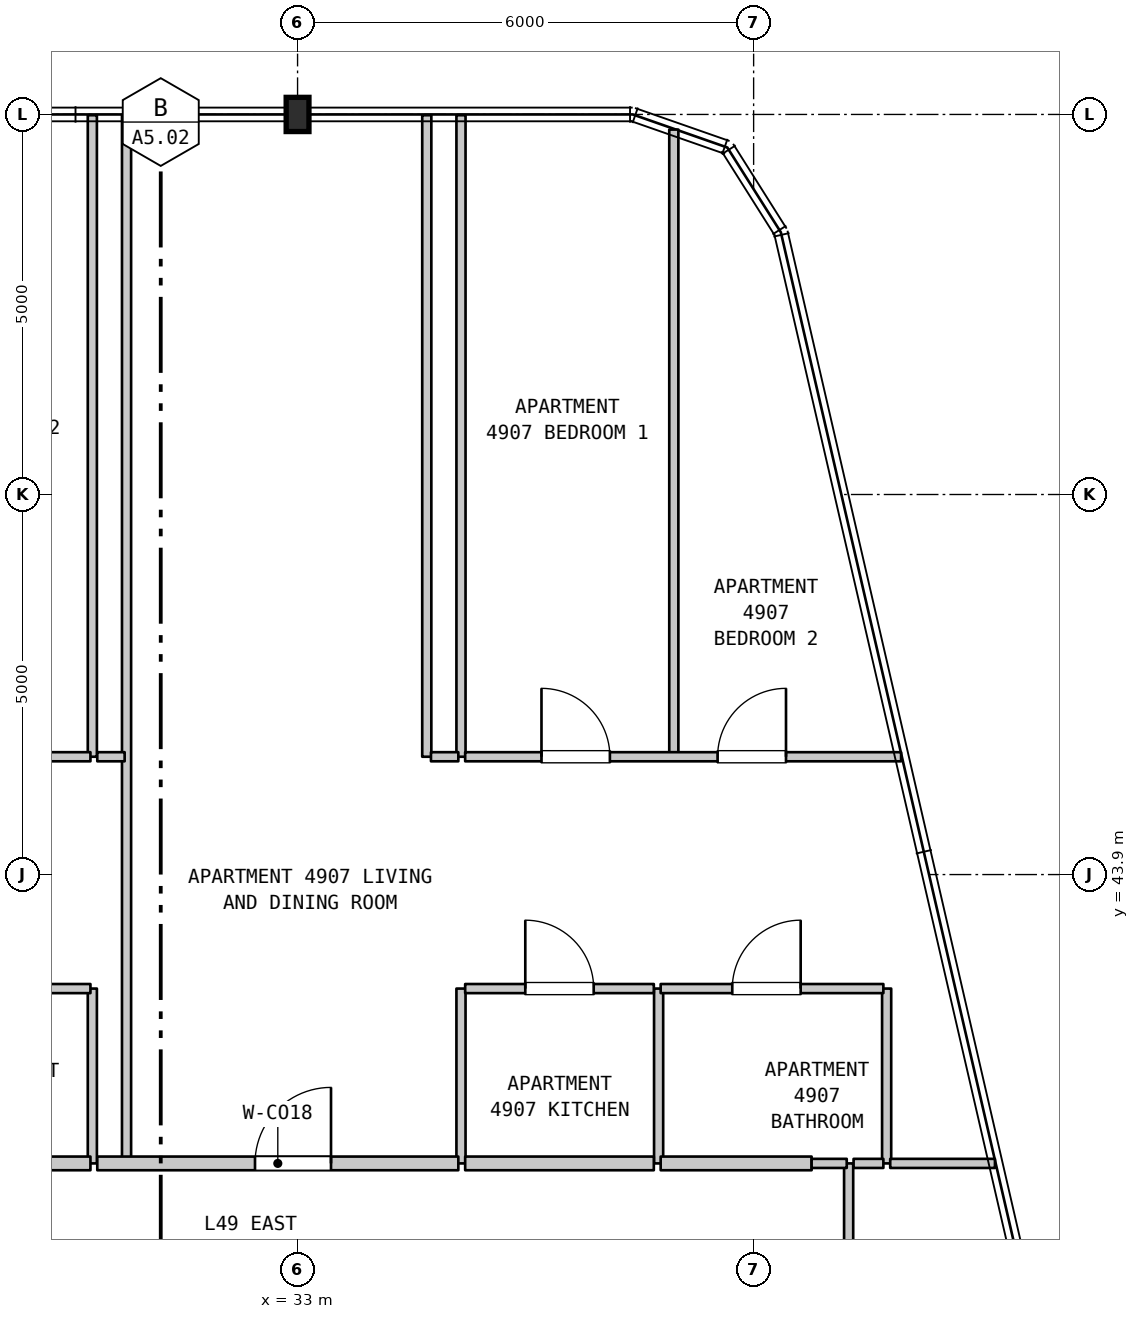
"""IFC4 building model, lengths in metres.
Left out: names, types, materials, properties, quantities, classifications, styles, units other than length and angle.
Written with IfcOpenShell. Run it as: python <this file> out.ifc"""

import sys

from ifc_helpers import new_model, si_unit, direction, frame, frame_2d, origin, origin_2d, place, context, subcontext, project, spatial, rectangle, i_section, extrude, element, fill, save


model = new_model("IFC4")
c1 = context("Model", 3, precision=1e-05, world=origin(), true_north=direction((0.0, 1.0)))
c2 = subcontext(c1, "Body", "Model", "MODEL_VIEW")
j1 = project(units=[si_unit("LENGTHUNIT", "METRE"), si_unit("PLANEANGLEUNIT", "RADIAN")], contexts=[c1])
p1 = place(None, origin())
s1 = spatial("IfcSite", under=j1, at=p1, CompositionType="ELEMENT")
p2 = place(p1, origin())
s2 = spatial("IfcBuilding", under=s1, at=p2, CompositionType="ELEMENT")
p3 = place(p2, frame((0.0, 0.0, 199.5)))
s3 = spatial("IfcBuildingStorey", under=s2, at=p3, CompositionType="ELEMENT", Elevation=199.5)
p4 = place(p3, frame((33.0, 53.9, 0.0), z_axis=(0.0, 0.0, 1.0), x_axis=(1.0, 0.0, 0.0)))
e1 = element("IfcColumn", 1, at=p4, inside=s3, PredefinedType="COLUMN", context=c2, shape_type="SweptSolid", body=[
    extrude(i_section(OverallWidth=0.3, OverallDepth=0.45, WebThickness=0.014, FlangeThickness=0.026, FilletRadius=0.027, at=origin_2d()), origin(), (0.0, 0.0, 1.0), 3.7),
])
p5 = place(p3, frame((30.3, 40.1, 0.0), z_axis=(0.0, 0.0, 1.0), x_axis=(0.0, 1.0, 0.0)))
e2 = element("IfcWall", 2, at=p5, inside=s3, PredefinedType="PARTITIONING", context=c2, shape_type="SweptSolid", body=[
    extrude(rectangle(XDim=2.3, YDim=0.12, at=frame_2d((1.15, 0.0))), origin(), (0.0, 0.0, 1.0), 3.39),
])
p6 = place(p3, frame((30.3, 45.45, 0.0), z_axis=(0.0, 0.0, 1.0), x_axis=(0.0, 1.0, 0.0)))
e3 = element("IfcWall", 3, at=p6, inside=s3, PredefinedType="PARTITIONING", context=c2, shape_type="SweptSolid", body=[
    extrude(rectangle(XDim=8.44, YDim=0.12, at=frame_2d((4.22, 0.0))), origin(), (0.0, 0.0, 1.0), 3.39),
])
p7 = place(p3, frame((30.75, 40.1, 0.0), z_axis=(0.0, 0.0, 1.0), x_axis=(0.0, 1.0, 0.0)))
e4 = element("IfcWall", 4, at=p7, inside=s3, PredefinedType="PARTITIONING", context=c2, shape_type="SweptSolid", body=[
    extrude(rectangle(XDim=13.79, YDim=0.12, at=frame_2d((6.895, 0.0))), origin(), (0.0, 0.0, 1.0), 3.39),
])
p8 = place(p3, frame((34.7, 45.45, 0.0), z_axis=(0.0, 0.0, 1.0), x_axis=(0.0, 1.0, 0.0)))
e5 = element("IfcWall", 5, at=p8, inside=s3, PredefinedType="PARTITIONING", context=c2, shape_type="SweptSolid", body=[
    extrude(rectangle(XDim=8.44, YDim=0.12, at=frame_2d((4.22, 0.0))), origin(), (0.0, 0.0, 1.0), 3.39),
])
p9 = place(p3, frame((35.15, 40.1, 0.0), z_axis=(0.0, 0.0, 1.0), x_axis=(0.0, 1.0, 0.0)))
e6 = element("IfcWall", 6, at=p9, inside=s3, PredefinedType="PARTITIONING", context=c2, shape_type="SweptSolid", body=[
    extrude(rectangle(XDim=2.3, YDim=0.12, at=frame_2d((1.15, 0.0))), origin(), (0.0, 0.0, 1.0), 3.39),
])
p10 = place(p3, frame((35.15, 45.45, 0.0), z_axis=(0.0, 0.0, 1.0), x_axis=(0.0, 1.0, 0.0)))
e7 = element("IfcWall", 7, at=p10, inside=s3, PredefinedType="PARTITIONING", context=c2, shape_type="SweptSolid", body=[
    extrude(rectangle(XDim=8.44, YDim=0.12, at=frame_2d((4.22, 0.0))), origin(), (0.0, 0.0, 1.0), 3.39),
])
p11 = place(p3, frame((37.75, 40.1, 0.0), z_axis=(0.0, 0.0, 1.0), x_axis=(0.0, 1.0, 0.0)))
e8 = element("IfcWall", 8, at=p11, inside=s3, PredefinedType="PARTITIONING", context=c2, shape_type="SweptSolid", body=[
    extrude(rectangle(XDim=2.3, YDim=0.12, at=frame_2d((1.15, 0.0))), origin(), (0.0, 0.0, 1.0), 3.39),
])
p12 = place(p3, frame((37.95, 45.45, 0.0), z_axis=(0.0, 0.0, 1.0), x_axis=(0.0, 1.0, 0.0)))
e9 = element("IfcWall", 9, at=p12, inside=s3, PredefinedType="PARTITIONING", context=c2, shape_type="SweptSolid", body=[
    extrude(rectangle(XDim=8.251, YDim=0.12, at=frame_2d((4.125, 0.0))), origin(), (0.0, 0.0, 1.0), 3.39),
])
p13 = place(p3, frame((40.25, 37.9, 0.0), z_axis=(0.0, 0.0, 1.0), x_axis=(0.0, 1.0, 0.0)))
e10 = element("IfcWall", 10, at=p13, inside=s3, PredefinedType="PARTITIONING", context=c2, shape_type="SweptSolid", body=[
    extrude(rectangle(XDim=2.2, YDim=0.12, at=frame_2d((1.1, 0.0))), origin(), (0.0, 0.0, 1.0), 3.39),
])
p14 = place(p3, frame((40.75, 40.1, 0.0), z_axis=(0.0, 0.0, 1.0), x_axis=(0.0, 1.0, 0.0)))
e11 = element("IfcWall", 11, at=p14, inside=s3, PredefinedType="PARTITIONING", context=c2, shape_type="SweptSolid", body=[
    extrude(rectangle(XDim=2.3, YDim=0.12, at=frame_2d((1.15, 0.0))), origin(), (0.0, 0.0, 1.0), 3.39),
])
p15 = place(p3, frame((27.125, 40.1, 0.0), z_axis=(0.0, 0.0, 1.0), x_axis=(1.0, 0.0, 0.0)))
e12 = element("IfcWall", 12, at=p15, inside=s3, PredefinedType="STANDARD", context=c2, shape_type="SweptSolid", body=[
    extrude(rectangle(XDim=3.15, YDim=0.18, at=frame_2d((1.575, 0.0))), origin(), (0.0, 0.0, 1.0), 3.39),
])
p16 = place(p3, frame((30.365, 40.1, 0.0), z_axis=(0.0, 0.0, 1.0), x_axis=(1.0, 0.0, 0.0)))
e13 = element("IfcWall", 13, at=p16, inside=s3, PredefinedType="STANDARD", context=c2, shape_type="SweptSolid", body=[
    extrude(rectangle(XDim=4.75, YDim=0.18, at=frame_2d((2.375, 0.0))), origin(), (0.0, 0.0, 1.0), 3.39),
])
p17 = place(p16, frame((2.075, 0.0, 0.0)))
e14 = element("IfcOpeningElement", 14, at=p17, cuts=e13, PredefinedType="OPENING", context=c2, shape_type="SweptSolid", body=[
    extrude(rectangle(XDim=1.0, YDim=2.15, at=frame_2d((0.5, 1.075))), frame((0.0, 0.1, 0.0), z_axis=(0.0, -1.0, 0.0), x_axis=(1.0, 0.0, 0.0)), (0.0, 0.0, 1.0), 0.2),
])
p18 = place(p3, frame((35.205, 40.1, 0.0), z_axis=(0.0, 0.0, 1.0), x_axis=(1.0, 0.0, 0.0)))
e15 = element("IfcWall", 15, at=p18, inside=s3, PredefinedType="STANDARD", context=c2, shape_type="SweptSolid", body=[
    extrude(rectangle(XDim=2.482, YDim=0.18, at=frame_2d((1.241, 0.0))), origin(), (0.0, 0.0, 1.0), 3.39),
])
p19 = place(p3, frame((37.777, 40.1, 0.0), z_axis=(0.0, 0.0, 1.0), x_axis=(1.0, 0.0, 0.0)))
e16 = element("IfcWall", 16, at=p19, inside=s3, PredefinedType="STANDARD", context=c2, shape_type="SweptSolid", body=[
    extrude(rectangle(XDim=1.986, YDim=0.18, at=frame_2d((0.993, 0.0))), origin(), (0.0, 0.0, 1.0), 3.39),
])
p20 = place(p3, frame((39.763, 40.1, 0.0), z_axis=(0.0, 0.0, 1.0), x_axis=(1.0, 0.0, 0.0)))
e17 = element("IfcWall", 17, at=p20, inside=s3, PredefinedType="PARTITIONING", context=c2, shape_type="SweptSolid", body=[
    extrude(rectangle(XDim=0.462, YDim=0.12, at=frame_2d((0.231, 0.0))), origin(), (0.0, 0.0, 1.0), 3.39),
])
p21 = place(p3, frame((40.315, 40.1, 0.0), z_axis=(0.0, 0.0, 1.0), x_axis=(1.0, 0.0, 0.0)))
e18 = element("IfcWall", 18, at=p21, inside=s3, PredefinedType="PARTITIONING", context=c2, shape_type="SweptSolid", body=[
    extrude(rectangle(XDim=0.392, YDim=0.12, at=frame_2d((0.196, 0.0))), origin(), (0.0, 0.0, 1.0), 3.39),
])
p22 = place(p3, frame((40.797, 40.1, 0.0), z_axis=(0.0, 0.0, 1.0), x_axis=(1.0, 0.0, 0.0)))
e19 = element("IfcWall", 19, at=p22, inside=s3, PredefinedType="PARTITIONING", context=c2, shape_type="SweptSolid", body=[
    extrude(rectangle(XDim=1.378, YDim=0.12, at=frame_2d((0.689, 0.0))), origin(), (0.0, 0.0, 1.0), 3.39),
])
p23 = place(p3, frame((27.125, 42.4, 0.0), z_axis=(0.0, 0.0, 1.0), x_axis=(1.0, 0.0, 0.0)))
e20 = element("IfcWall", 20, at=p23, inside=s3, PredefinedType="PARTITIONING", context=c2, shape_type="SweptSolid", body=[
    extrude(rectangle(XDim=3.15, YDim=0.12, at=frame_2d((1.575, 0.0))), origin(), (0.0, 0.0, 1.0), 3.39),
])
p24 = place(p23, frame((1.054, 0.0, 0.0)))
e21 = element("IfcOpeningElement", 21, at=p24, cuts=e20, PredefinedType="OPENING", context=c2, shape_type="SweptSolid", body=[
    extrude(rectangle(XDim=0.9, YDim=2.1, at=frame_2d((0.45, 1.05))), frame((0.0, 0.07, 0.0), z_axis=(0.0, -1.0, 0.0), x_axis=(1.0, 0.0, 0.0)), (0.0, 0.0, 1.0), 0.14),
])
p25 = place(p3, frame((35.205, 42.4, 0.0), z_axis=(0.0, 0.0, 1.0), x_axis=(1.0, 0.0, 0.0)))
e22 = element("IfcWall", 22, at=p25, inside=s3, PredefinedType="PARTITIONING", context=c2, shape_type="SweptSolid", body=[
    extrude(rectangle(XDim=2.482, YDim=0.12, at=frame_2d((1.241, 0.0))), origin(), (0.0, 0.0, 1.0), 3.39),
])
p26 = place(p25, frame((0.791, 0.0, 0.0)))
e23 = element("IfcOpeningElement", 23, at=p26, cuts=e22, PredefinedType="OPENING", context=c2, shape_type="SweptSolid", body=[
    extrude(rectangle(XDim=0.9, YDim=2.15, at=frame_2d((0.45, 1.075))), frame((0.0, 0.07, 0.0), z_axis=(0.0, -1.0, 0.0), x_axis=(1.0, 0.0, 0.0)), (0.0, 0.0, 1.0), 0.14),
])
p27 = place(p3, frame((37.777, 42.4, 0.0), z_axis=(0.0, 0.0, 1.0), x_axis=(1.0, 0.0, 0.0)))
e24 = element("IfcWall", 24, at=p27, inside=s3, PredefinedType="PARTITIONING", context=c2, shape_type="SweptSolid", body=[
    extrude(rectangle(XDim=2.93, YDim=0.12, at=frame_2d((1.465, 0.0))), origin(), (0.0, 0.0, 1.0), 3.39),
])
p28 = place(p27, frame((0.942, 0.0, 0.0)))
e25 = element("IfcOpeningElement", 25, at=p28, cuts=e24, PredefinedType="OPENING", context=c2, shape_type="SweptSolid", body=[
    extrude(rectangle(XDim=0.9, YDim=2.1, at=frame_2d((0.45, 1.05))), frame((0.0, 0.07, 0.0), z_axis=(0.0, -1.0, 0.0), x_axis=(1.0, 0.0, 0.0)), (0.0, 0.0, 1.0), 0.14),
])
p29 = place(p3, frame((24.365, 45.45, 0.0), z_axis=(0.0, 0.0, 1.0), x_axis=(1.0, 0.0, 0.0)))
e26 = element("IfcWall", 26, at=p29, inside=s3, PredefinedType="PARTITIONING", context=c2, shape_type="SweptSolid", body=[
    extrude(rectangle(XDim=5.91, YDim=0.12, at=frame_2d((2.955, 0.0))), origin(), (0.0, 0.0, 1.0), 3.39),
])
p30 = place(p29, frame((1.11, 0.0, 0.0)))
e27 = element("IfcOpeningElement", 27, at=p30, cuts=e26, PredefinedType="OPENING", context=c2, shape_type="SweptSolid", body=[
    extrude(rectangle(XDim=0.9, YDim=2.15, at=frame_2d((0.45, 1.075))), frame((0.0, 0.07, 0.0), z_axis=(0.0, -1.0, 0.0), x_axis=(1.0, 0.0, 0.0)), (0.0, 0.0, 1.0), 0.14),
])
p31 = place(p29, frame((3.76, 0.0, 0.0)))
e28 = element("IfcOpeningElement", 28, at=p31, cuts=e26, PredefinedType="OPENING", context=c2, shape_type="SweptSolid", body=[
    extrude(rectangle(XDim=0.9, YDim=2.15, at=frame_2d((0.45, 1.075))), frame((0.0, 0.07, 0.0), z_axis=(0.0, -1.0, 0.0), x_axis=(1.0, 0.0, 0.0)), (0.0, 0.0, 1.0), 0.14),
])
for number, where, z_axis, x_axis in (
    (29, (30.365, 45.45, 0.0), (0.0, 0.0, 1.0), (1.0, 0.0, 0.0)),
    (30, (34.755, 45.45, 0.0), (0.0, 0.0, 1.0), (1.0, 0.0, 0.0)),
):
    element("IfcWall", number, at=place(p3, frame(where, z_axis=z_axis, x_axis=x_axis)), inside=s3, PredefinedType="PARTITIONING", context=c2, shape_type="SweptSolid", body=[
        extrude(rectangle(XDim=0.36, YDim=0.12, at=frame_2d((0.18, 0.0))), origin(), (0.0, 0.0, 1.0), 3.39),
    ])
p32 = place(p3, frame((35.205, 45.45, 0.0), z_axis=(0.0, 0.0, 1.0), x_axis=(1.0, 0.0, 0.0)))
e31 = element("IfcWall", 31, at=p32, inside=s3, PredefinedType="PARTITIONING", context=c2, shape_type="SweptSolid", body=[
    extrude(rectangle(XDim=5.735, YDim=0.12, at=frame_2d((2.867, 0.0))), origin(), (0.0, 0.0, 1.0), 3.39),
])
p33 = place(p32, frame((1.004, 0.0, 0.0)))
e32 = element("IfcOpeningElement", 32, at=p33, cuts=e31, PredefinedType="OPENING", context=c2, shape_type="SweptSolid", body=[
    extrude(rectangle(XDim=0.9, YDim=2.15, at=frame_2d((0.45, 1.075))), frame((0.0, 0.07, 0.0), z_axis=(0.0, -1.0, 0.0), x_axis=(1.0, 0.0, 0.0)), (0.0, 0.0, 1.0), 0.14),
])
p34 = place(p32, frame((3.321, 0.0, 0.0)))
e33 = element("IfcOpeningElement", 33, at=p34, cuts=e31, PredefinedType="OPENING", context=c2, shape_type="SweptSolid", body=[
    extrude(rectangle(XDim=0.9, YDim=2.15, at=frame_2d((0.45, 1.075))), frame((0.0, 0.07, 0.0), z_axis=(0.0, -1.0, 0.0), x_axis=(1.0, 0.0, 0.0)), (0.0, 0.0, 1.0), 0.14),
])
p35 = place(p17, origin())
e34 = element("IfcDoor", 34, at=p35, inside=s3, OperationType="SINGLE_SWING_RIGHT", PredefinedType="DOOR", context=c2, shape_type="SweptSolid", body=[
    extrude(rectangle(XDim=1.0, YDim=2.15, at=frame_2d((0.5, 1.075))), frame((0.0, 0.025, 0.0), z_axis=(0.0, -1.0, 0.0), x_axis=(1.0, 0.0, 0.0)), (0.0, 0.0, 1.0), 0.05),
])
fill(e14, e34)
p36 = place(p26, origin())
e35 = element("IfcDoor", 35, at=p36, inside=s3, OperationType="SINGLE_SWING_LEFT", PredefinedType="DOOR", context=c2, shape_type="SweptSolid", body=[
    extrude(rectangle(XDim=0.9, YDim=2.15, at=frame_2d((0.45, 1.075))), frame((0.0, 0.025, 0.0), z_axis=(0.0, -1.0, 0.0), x_axis=(1.0, 0.0, 0.0)), (0.0, 0.0, 1.0), 0.05),
])
fill(e23, e35)
p37 = place(p28, origin())
e36 = element("IfcDoor", 36, at=p37, inside=s3, OperationType="SINGLE_SWING_RIGHT", PredefinedType="DOOR", context=c2, shape_type="SweptSolid", body=[
    extrude(rectangle(XDim=0.9, YDim=2.1, at=frame_2d((0.45, 1.05))), frame((0.0, 0.025, 0.0), z_axis=(0.0, -1.0, 0.0), x_axis=(1.0, 0.0, 0.0)), (0.0, 0.0, 1.0), 0.05),
])
fill(e25, e36)
p38 = place(p33, origin())
e37 = element("IfcDoor", 37, at=p38, inside=s3, OperationType="SINGLE_SWING_LEFT", PredefinedType="DOOR", context=c2, shape_type="SweptSolid", body=[
    extrude(rectangle(XDim=0.9, YDim=2.15, at=frame_2d((0.45, 1.075))), frame((0.0, 0.025, 0.0), z_axis=(0.0, -1.0, 0.0), x_axis=(1.0, 0.0, 0.0)), (0.0, 0.0, 1.0), 0.05),
])
fill(e32, e37)
p39 = place(p34, origin())
e38 = element("IfcDoor", 38, at=p39, inside=s3, OperationType="SINGLE_SWING_RIGHT", PredefinedType="DOOR", context=c2, shape_type="SweptSolid", body=[
    extrude(rectangle(XDim=0.9, YDim=2.15, at=frame_2d((0.45, 1.075))), frame((0.0, 0.025, 0.0), z_axis=(0.0, -1.0, 0.0), x_axis=(1.0, 0.0, 0.0)), (0.0, 0.0, 1.0), 0.05),
])
fill(e33, e38)
save(model, sys.argv[1])
